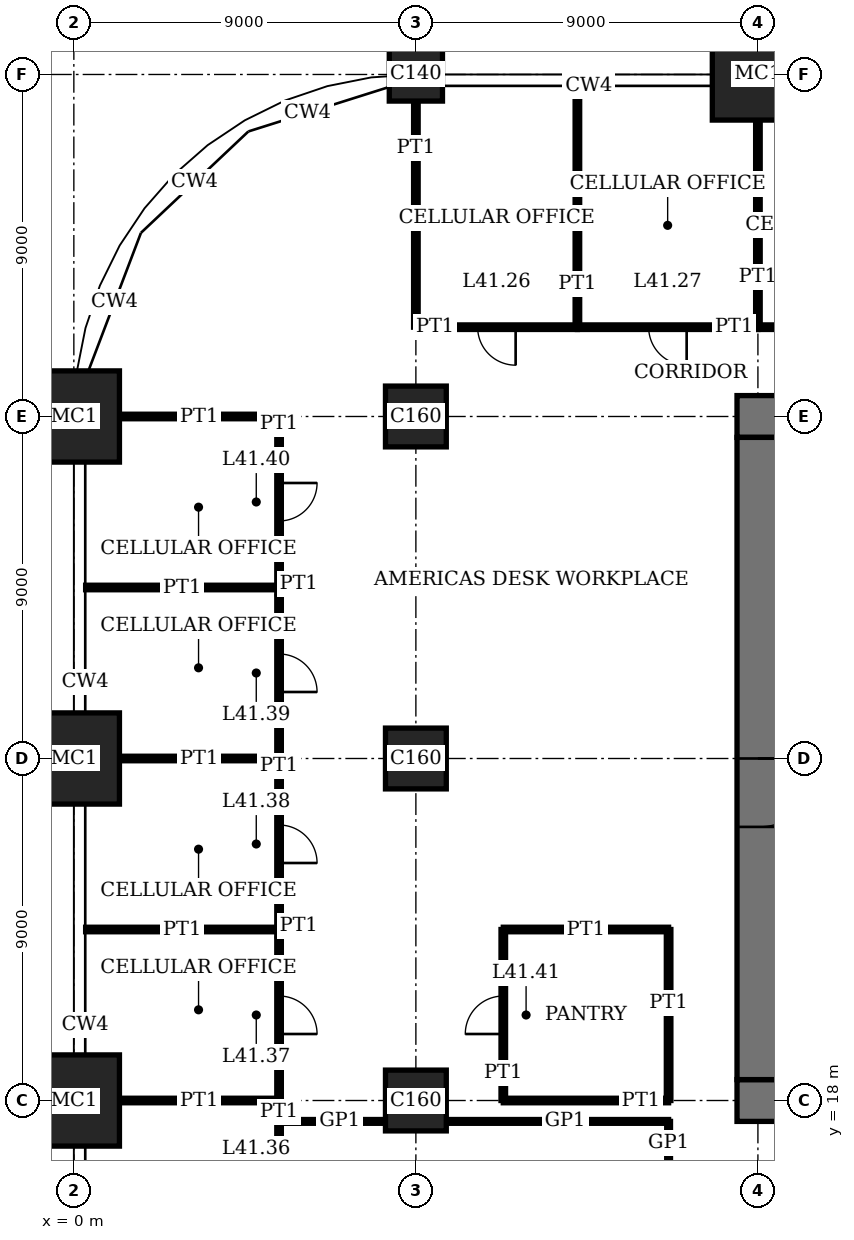
"""IFC4 building model, lengths in metres.
Left out: names, types, materials, properties, quantities, classifications, styles, units other than length and angle.
Written with IfcOpenShell. Run it as: python <this file> out.ifc"""

import sys

from ifc_helpers import new_model, si_unit, direction, frame, frame_2d, origin, origin_2d, place, context, subcontext, project, spatial, rectangle, extrude, element, fill, save


model = new_model("IFC4")
c1 = context("Model", 3, precision=1e-05, world=origin(), true_north=direction((0.0, 1.0)))
c2 = subcontext(c1, "Body", "Model", "MODEL_VIEW")
j1 = project(units=[si_unit("LENGTHUNIT", "METRE"), si_unit("PLANEANGLEUNIT", "RADIAN")], contexts=[c1])
p1 = place(None, origin())
s1 = spatial("IfcSite", under=j1, at=p1, CompositionType="ELEMENT")
p2 = place(p1, origin())
s2 = spatial("IfcBuilding", under=s1, at=p2, CompositionType="ELEMENT")
p3 = place(p2, frame((0.0, 0.0, 170.2)))
s3 = spatial("IfcBuildingStorey", under=s2, at=p3, CompositionType="ELEMENT", Elevation=170.2)
for number, where, z_axis, x_axis in (
    (1, (0.0, 18.0, 0.0), (0.0, 0.0, 1.0), (1.0, 0.0, 0.0)),
    (2, (0.0, 27.0, 0.0), (0.0, 0.0, 1.0), (1.0, 0.0, 0.0)),
    (3, (0.0, 36.0, 0.0), (0.0, 0.0, 1.0), (1.0, 0.0, 0.0)),
):
    element("IfcColumn", number, at=place(p3, frame(where, z_axis=z_axis, x_axis=x_axis)), inside=s3, PredefinedType="COLUMN", context=c2, shape_type="SweptSolid", body=[
        extrude(rectangle(XDim=2.4, YDim=2.4, at=origin_2d()), origin(), (0.0, 0.0, 1.0), 4.0),
    ])
for number, where, z_axis, x_axis in (
    (4, (9.0, 18.0, 0.0), (0.0, 0.0, 1.0), (1.0, 0.0, 0.0)),
    (5, (9.0, 27.0, 0.0), (0.0, 0.0, 1.0), (1.0, 0.0, 0.0)),
    (6, (9.0, 36.0, 0.0), (0.0, 0.0, 1.0), (1.0, 0.0, 0.0)),
):
    element("IfcColumn", number, at=place(p3, frame(where, z_axis=z_axis, x_axis=x_axis)), inside=s3, PredefinedType="COLUMN", context=c2, shape_type="SweptSolid", body=[
        extrude(rectangle(XDim=1.6, YDim=1.6, at=origin_2d()), origin(), (0.0, 0.0, 1.0), 4.0),
    ])
p4 = place(p3, frame((9.0, 45.0, 0.0), z_axis=(0.0, 0.0, 1.0), x_axis=(1.0, 0.0, 0.0)))
e7 = element("IfcColumn", 7, at=p4, inside=s3, PredefinedType="COLUMN", context=c2, shape_type="SweptSolid", body=[
    extrude(rectangle(XDim=1.4, YDim=1.4, at=origin_2d()), origin(), (0.0, 0.0, 1.0), 4.0),
])
p5 = place(p3, frame((18.0, 45.0, 0.0), z_axis=(0.0, 0.0, 1.0), x_axis=(1.0, 0.0, 0.0)))
e8 = element("IfcColumn", 8, at=p5, inside=s3, PredefinedType="COLUMN", context=c2, shape_type="SweptSolid", body=[
    extrude(rectangle(XDim=2.4, YDim=2.4, at=origin_2d()), origin(), (0.0, 0.0, 1.0), 4.0),
])
p6 = place(p3, frame((17.45, 18.0, 0.0), z_axis=(0.0, 0.0, 1.0), x_axis=(1.0, 0.0, 0.0)))
e9 = element("IfcWall", 9, at=p6, inside=s3, PredefinedType="SHEAR", context=c2, shape_type="SweptSolid", body=[
    extrude(rectangle(XDim=28.1, YDim=1.1, at=frame_2d((14.05, 0.0))), origin(), (0.0, 0.0, 1.0), 4.0),
])
p7 = place(p6, frame((11.55, 0.0, 0.0)))
e10 = element("IfcOpeningElement", 10, at=p7, cuts=e9, PredefinedType="OPENING", context=c2, shape_type="SweptSolid", body=[
    extrude(rectangle(XDim=1.0, YDim=2.4, at=frame_2d((0.5, 1.2))), frame((0.0, 0.56, 0.0), z_axis=(0.0, -1.0, 0.0), x_axis=(1.0, 0.0, 0.0)), (0.0, 0.0, 1.0), 1.12),
])
p8 = place(p6, frame((16.55, 0.0, 0.0)))
e11 = element("IfcOpeningElement", 11, at=p8, cuts=e9, PredefinedType="OPENING", context=c2, shape_type="SweptSolid", body=[
    extrude(rectangle(XDim=1.0, YDim=2.4, at=frame_2d((0.5, 1.2))), frame((0.0, 0.56, 0.0), z_axis=(0.0, -1.0, 0.0), x_axis=(1.0, 0.0, 0.0)), (0.0, 0.0, 1.0), 1.12),
])
p9 = place(p6, frame((20.0, 0.0, 0.0)))
e12 = element("IfcOpeningElement", 12, at=p9, cuts=e9, PredefinedType="OPENING", context=c2, shape_type="SweptSolid", body=[
    extrude(rectangle(XDim=1.1, YDim=2.4, at=frame_2d((0.55, 1.2))), frame((0.0, 0.56, 0.0), z_axis=(0.0, -1.0, 0.0), x_axis=(1.0, 0.0, 0.0)), (0.0, 0.0, 1.0), 1.12),
])
p10 = place(p6, frame((24.05, 0.0, 0.0)))
e13 = element("IfcOpeningElement", 13, at=p10, cuts=e9, PredefinedType="OPENING", context=c2, shape_type="SweptSolid", body=[
    extrude(rectangle(XDim=1.0, YDim=2.4, at=frame_2d((0.5, 1.2))), frame((0.0, 0.56, 0.0), z_axis=(0.0, -1.0, 0.0), x_axis=(1.0, 0.0, 0.0)), (0.0, 0.0, 1.0), 1.12),
])
p11 = place(p3, frame((45.55, 36.0, 0.0), z_axis=(0.0, 0.0, 1.0), x_axis=(-1.0, 0.0, 0.0)))
e14 = element("IfcWall", 14, at=p11, inside=s3, PredefinedType="SHEAR", context=c2, shape_type="SweptSolid", body=[
    extrude(rectangle(XDim=28.1, YDim=1.1, at=frame_2d((14.05, 0.0))), origin(), (0.0, 0.0, 1.0), 4.0),
])
p12 = place(p11, frame((11.55, 0.0, 0.0)))
e15 = element("IfcOpeningElement", 15, at=p12, cuts=e14, PredefinedType="OPENING", context=c2, shape_type="SweptSolid", body=[
    extrude(rectangle(XDim=1.0, YDim=2.4, at=frame_2d((0.5, 1.2))), frame((0.0, 0.56, 0.0), z_axis=(0.0, -1.0, 0.0), x_axis=(1.0, 0.0, 0.0)), (0.0, 0.0, 1.0), 1.12),
])
p13 = place(p11, frame((16.55, 0.0, 0.0)))
e16 = element("IfcOpeningElement", 16, at=p13, cuts=e14, PredefinedType="OPENING", context=c2, shape_type="SweptSolid", body=[
    extrude(rectangle(XDim=1.0, YDim=2.4, at=frame_2d((0.5, 1.2))), frame((0.0, 0.56, 0.0), z_axis=(0.0, -1.0, 0.0), x_axis=(1.0, 0.0, 0.0)), (0.0, 0.0, 1.0), 1.12),
])
p14 = place(p11, frame((20.0, 0.0, 0.0)))
e17 = element("IfcOpeningElement", 17, at=p14, cuts=e14, PredefinedType="OPENING", context=c2, shape_type="SweptSolid", body=[
    extrude(rectangle(XDim=1.1, YDim=2.4, at=frame_2d((0.55, 1.2))), frame((0.0, 0.56, 0.0), z_axis=(0.0, -1.0, 0.0), x_axis=(1.0, 0.0, 0.0)), (0.0, 0.0, 1.0), 1.12),
])
p15 = place(p11, frame((24.05, 0.0, 0.0)))
e18 = element("IfcOpeningElement", 18, at=p15, cuts=e14, PredefinedType="OPENING", context=c2, shape_type="SweptSolid", body=[
    extrude(rectangle(XDim=1.0, YDim=2.4, at=frame_2d((0.5, 1.2))), frame((0.0, 0.56, 0.0), z_axis=(0.0, -1.0, 0.0), x_axis=(1.0, 0.0, 0.0)), (0.0, 0.0, 1.0), 1.12),
])
p16 = place(p3, frame((18.0, 35.45, 0.0), z_axis=(0.0, 0.0, 1.0), x_axis=(0.0, -1.0, 0.0)))
e19 = element("IfcWall", 19, at=p16, inside=s3, PredefinedType="SHEAR", context=c2, shape_type="SweptSolid", body=[
    extrude(rectangle(XDim=16.9, YDim=1.1, at=frame_2d((8.45, 0.0))), origin(), (0.0, 0.0, 1.0), 4.0),
])
p17 = place(p16, frame((8.45, 0.0, 0.0)))
e20 = element("IfcOpeningElement", 20, at=p17, cuts=e19, PredefinedType="OPENING", context=c2, shape_type="SweptSolid", body=[
    extrude(rectangle(XDim=1.8, YDim=2.4, at=frame_2d((0.9, 1.2))), frame((0.0, 0.56, 0.0), z_axis=(0.0, -1.0, 0.0), x_axis=(1.0, 0.0, 0.0)), (0.0, 0.0, 1.0), 1.12),
])
p18 = place(p3, frame((5.39, 17.45, 0.0), z_axis=(0.0, 0.0, 1.0), x_axis=(1.0, 0.0, 0.0)))
e21 = element("IfcWall", 21, at=p18, inside=s3, PredefinedType="PARTITIONING", context=c2, shape_type="SweptSolid", body=[
    extrude(rectangle(XDim=2.81, YDim=0.1, at=frame_2d((1.405, 0.0))), origin(), (0.0, 0.0, 1.0), 3.75),
])
p19 = place(p3, frame((9.8, 17.45, 0.0), z_axis=(0.0, 0.0, 1.0), x_axis=(1.0, 0.0, 0.0)))
e22 = element("IfcWall", 22, at=p19, inside=s3, PredefinedType="PARTITIONING", context=c2, shape_type="SweptSolid", body=[
    extrude(rectangle(XDim=5.85, YDim=0.1, at=frame_2d((2.925, 0.0))), origin(), (0.0, 0.0, 1.0), 3.75),
])
p20 = place(p3, frame((1.2, 18.0, 0.0), z_axis=(0.0, 0.0, 1.0), x_axis=(1.0, 0.0, 0.0)))
e23 = element("IfcWall", 23, at=p20, inside=s3, PredefinedType="PARTITIONING", context=c2, shape_type="SweptSolid", body=[
    extrude(rectangle(XDim=4.2, YDim=0.12, at=frame_2d((2.1, 0.0))), origin(), (0.0, 0.0, 1.0), 3.05),
])
p21 = place(p3, frame((11.3, 18.0, 0.0), z_axis=(0.0, 0.0, 1.0), x_axis=(1.0, 0.0, 0.0)))
e24 = element("IfcWall", 24, at=p21, inside=s3, PredefinedType="PARTITIONING", context=c2, shape_type="SweptSolid", body=[
    extrude(rectangle(XDim=4.35, YDim=0.12, at=frame_2d((2.175, 0.0))), origin(), (0.0, 0.0, 1.0), 3.05),
])
p22 = place(p3, frame((0.31, 22.5, 0.0), z_axis=(0.0, 0.0, 1.0), x_axis=(1.0, 0.0, 0.0)))
e25 = element("IfcWall", 25, at=p22, inside=s3, PredefinedType="PARTITIONING", context=c2, shape_type="SweptSolid", body=[
    extrude(rectangle(XDim=5.09, YDim=0.12, at=frame_2d((2.545, 0.0))), origin(), (0.0, 0.0, 1.0), 3.1),
])
p23 = place(p3, frame((11.3, 22.5, 0.0), z_axis=(0.0, 0.0, 1.0), x_axis=(1.0, 0.0, 0.0)))
e26 = element("IfcWall", 26, at=p23, inside=s3, PredefinedType="PARTITIONING", context=c2, shape_type="SweptSolid", body=[
    extrude(rectangle(XDim=4.35, YDim=0.12, at=frame_2d((2.175, 0.0))), origin(), (0.0, 0.0, 1.0), 3.1),
])
p24 = place(p3, frame((1.2, 27.0, 0.0), z_axis=(0.0, 0.0, 1.0), x_axis=(1.0, 0.0, 0.0)))
e27 = element("IfcWall", 27, at=p24, inside=s3, PredefinedType="PARTITIONING", context=c2, shape_type="SweptSolid", body=[
    extrude(rectangle(XDim=4.2, YDim=0.12, at=frame_2d((2.1, 0.0))), origin(), (0.0, 0.0, 1.0), 3.05),
])
p25 = place(p3, frame((0.31, 31.5, 0.0), z_axis=(0.0, 0.0, 1.0), x_axis=(1.0, 0.0, 0.0)))
e28 = element("IfcWall", 28, at=p25, inside=s3, PredefinedType="PARTITIONING", context=c2, shape_type="SweptSolid", body=[
    extrude(rectangle(XDim=5.09, YDim=0.12, at=frame_2d((2.545, 0.0))), origin(), (0.0, 0.0, 1.0), 3.1),
])
p26 = place(p3, frame((1.2, 36.0, 0.0), z_axis=(0.0, 0.0, 1.0), x_axis=(1.0, 0.0, 0.0)))
e29 = element("IfcWall", 29, at=p26, inside=s3, PredefinedType="PARTITIONING", context=c2, shape_type="SweptSolid", body=[
    extrude(rectangle(XDim=4.2, YDim=0.12, at=frame_2d((2.1, 0.0))), origin(), (0.0, 0.0, 1.0), 3.05),
])
p27 = place(p3, frame((9.0, 38.35, 0.0), z_axis=(0.0, 0.0, 1.0), x_axis=(1.0, 0.0, 0.0)))
e30 = element("IfcWall", 30, at=p27, inside=s3, PredefinedType="PARTITIONING", context=c2, shape_type="SweptSolid", body=[
    extrude(rectangle(XDim=4.25, YDim=0.12, at=frame_2d((2.125, 0.0))), origin(), (0.0, 0.0, 1.0), 3.75),
])
p28 = place(p27, frame((1.625, 0.0, 0.0)))
e31 = element("IfcOpeningElement", 31, at=p28, cuts=e30, PredefinedType="OPENING", context=c2, shape_type="SweptSolid", body=[
    extrude(rectangle(XDim=1.0, YDim=2.4, at=frame_2d((0.5, 1.2))), frame((0.0, 0.07, 0.0), z_axis=(0.0, -1.0, 0.0), x_axis=(1.0, 0.0, 0.0)), (0.0, 0.0, 1.0), 0.14),
])
p29 = place(p3, frame((13.25, 38.35, 0.0), z_axis=(0.0, 0.0, 1.0), x_axis=(1.0, 0.0, 0.0)))
e32 = element("IfcWall", 32, at=p29, inside=s3, PredefinedType="PARTITIONING", context=c2, shape_type="SweptSolid", body=[
    extrude(rectangle(XDim=4.75, YDim=0.12, at=frame_2d((2.375, 0.0))), origin(), (0.0, 0.0, 1.0), 3.75),
])
p30 = place(p29, frame((1.875, 0.0, 0.0)))
e33 = element("IfcOpeningElement", 33, at=p30, cuts=e32, PredefinedType="OPENING", context=c2, shape_type="SweptSolid", body=[
    extrude(rectangle(XDim=1.0, YDim=2.4, at=frame_2d((0.5, 1.2))), frame((0.0, 0.07, 0.0), z_axis=(0.0, -1.0, 0.0), x_axis=(1.0, 0.0, 0.0)), (0.0, 0.0, 1.0), 0.14),
])
p31 = place(p3, frame((18.0, 38.35, 0.0), z_axis=(0.0, 0.0, 1.0), x_axis=(1.0, 0.0, 0.0)))
e34 = element("IfcWall", 34, at=p31, inside=s3, PredefinedType="PARTITIONING", context=c2, shape_type="SweptSolid", body=[
    extrude(rectangle(XDim=4.5, YDim=0.12, at=frame_2d((2.25, 0.0))), origin(), (0.0, 0.0, 1.0), 3.75),
])
p32 = place(p31, frame((1.75, 0.0, 0.0)))
e35 = element("IfcOpeningElement", 35, at=p32, cuts=e34, PredefinedType="OPENING", context=c2, shape_type="SweptSolid", body=[
    extrude(rectangle(XDim=1.0, YDim=2.4, at=frame_2d((0.5, 1.2))), frame((0.0, 0.07, 0.0), z_axis=(0.0, -1.0, 0.0), x_axis=(1.0, 0.0, 0.0)), (0.0, 0.0, 1.0), 0.14),
])
p33 = place(p3, frame((5.4, 13.25, 0.0), z_axis=(0.0, 0.0, 1.0), x_axis=(0.0, 1.0, 0.0)))
e36 = element("IfcWall", 36, at=p33, inside=s3, PredefinedType="PARTITIONING", context=c2, shape_type="SweptSolid", body=[
    extrude(rectangle(XDim=4.75, YDim=0.12, at=frame_2d((2.375, 0.0))), origin(), (0.0, 0.0, 1.0), 3.75),
])
p34 = place(p33, frame((1.875, 0.0, 0.0)))
e37 = element("IfcOpeningElement", 37, at=p34, cuts=e36, PredefinedType="OPENING", context=c2, shape_type="SweptSolid", body=[
    extrude(rectangle(XDim=1.0, YDim=2.4, at=frame_2d((0.5, 1.2))), frame((0.0, 0.07, 0.0), z_axis=(0.0, -1.0, 0.0), x_axis=(1.0, 0.0, 0.0)), (0.0, 0.0, 1.0), 0.14),
])
p35 = place(p3, frame((5.4, 18.0, 0.0), z_axis=(0.0, 0.0, 1.0), x_axis=(0.0, 1.0, 0.0)))
e38 = element("IfcWall", 38, at=p35, inside=s3, PredefinedType="PARTITIONING", context=c2, shape_type="SweptSolid", body=[
    extrude(rectangle(XDim=4.5, YDim=0.12, at=frame_2d((2.25, 0.0))), origin(), (0.0, 0.0, 1.0), 3.75),
])
p36 = place(p35, frame((1.75, 0.0, 0.0)))
e39 = element("IfcOpeningElement", 39, at=p36, cuts=e38, PredefinedType="OPENING", context=c2, shape_type="SweptSolid", body=[
    extrude(rectangle(XDim=1.0, YDim=2.4, at=frame_2d((0.5, 1.2))), frame((0.0, 0.07, 0.0), z_axis=(0.0, -1.0, 0.0), x_axis=(1.0, 0.0, 0.0)), (0.0, 0.0, 1.0), 0.14),
])
p37 = place(p3, frame((5.4, 22.5, 0.0), z_axis=(0.0, 0.0, 1.0), x_axis=(0.0, 1.0, 0.0)))
e40 = element("IfcWall", 40, at=p37, inside=s3, PredefinedType="PARTITIONING", context=c2, shape_type="SweptSolid", body=[
    extrude(rectangle(XDim=4.5, YDim=0.12, at=frame_2d((2.25, 0.0))), origin(), (0.0, 0.0, 1.0), 3.75),
])
p38 = place(p37, frame((1.75, 0.0, 0.0)))
e41 = element("IfcOpeningElement", 41, at=p38, cuts=e40, PredefinedType="OPENING", context=c2, shape_type="SweptSolid", body=[
    extrude(rectangle(XDim=1.0, YDim=2.4, at=frame_2d((0.5, 1.2))), frame((0.0, 0.07, 0.0), z_axis=(0.0, -1.0, 0.0), x_axis=(1.0, 0.0, 0.0)), (0.0, 0.0, 1.0), 0.14),
])
p39 = place(p3, frame((5.4, 27.0, 0.0), z_axis=(0.0, 0.0, 1.0), x_axis=(0.0, 1.0, 0.0)))
e42 = element("IfcWall", 42, at=p39, inside=s3, PredefinedType="PARTITIONING", context=c2, shape_type="SweptSolid", body=[
    extrude(rectangle(XDim=4.5, YDim=0.12, at=frame_2d((2.25, 0.0))), origin(), (0.0, 0.0, 1.0), 3.75),
])
p40 = place(p39, frame((1.75, 0.0, 0.0)))
e43 = element("IfcOpeningElement", 43, at=p40, cuts=e42, PredefinedType="OPENING", context=c2, shape_type="SweptSolid", body=[
    extrude(rectangle(XDim=1.0, YDim=2.4, at=frame_2d((0.5, 1.2))), frame((0.0, 0.07, 0.0), z_axis=(0.0, -1.0, 0.0), x_axis=(1.0, 0.0, 0.0)), (0.0, 0.0, 1.0), 0.14),
])
p41 = place(p3, frame((5.4, 31.5, 0.0), z_axis=(0.0, 0.0, 1.0), x_axis=(0.0, 1.0, 0.0)))
e44 = element("IfcWall", 44, at=p41, inside=s3, PredefinedType="PARTITIONING", context=c2, shape_type="SweptSolid", body=[
    extrude(rectangle(XDim=4.5, YDim=0.12, at=frame_2d((2.25, 0.0))), origin(), (0.0, 0.0, 1.0), 3.75),
])
p42 = place(p41, frame((1.75, 0.0, 0.0)))
e45 = element("IfcOpeningElement", 45, at=p42, cuts=e44, PredefinedType="OPENING", context=c2, shape_type="SweptSolid", body=[
    extrude(rectangle(XDim=1.0, YDim=2.4, at=frame_2d((0.5, 1.2))), frame((0.0, 0.07, 0.0), z_axis=(0.0, -1.0, 0.0), x_axis=(1.0, 0.0, 0.0)), (0.0, 0.0, 1.0), 0.14),
])
p43 = place(p3, frame((9.0, 38.35, 0.0), z_axis=(0.0, 0.0, 1.0), x_axis=(0.0, 1.0, 0.0)))
e46 = element("IfcWall", 46, at=p43, inside=s3, PredefinedType="PARTITIONING", context=c2, shape_type="SweptSolid", body=[
    extrude(rectangle(XDim=5.95, YDim=0.12, at=frame_2d((2.975, 0.0))), origin(), (0.0, 0.0, 1.0), 3.05),
])
p44 = place(p3, frame((11.3, 18.0, 0.0), z_axis=(0.0, 0.0, 1.0), x_axis=(0.0, 1.0, 0.0)))
e47 = element("IfcWall", 47, at=p44, inside=s3, PredefinedType="PARTITIONING", context=c2, shape_type="SweptSolid", body=[
    extrude(rectangle(XDim=4.5, YDim=0.12, at=frame_2d((2.25, 0.0))), origin(), (0.0, 0.0, 1.0), 3.75),
])
p45 = place(p44, frame((1.75, 0.0, 0.0)))
e48 = element("IfcOpeningElement", 48, at=p45, cuts=e47, PredefinedType="OPENING", context=c2, shape_type="SweptSolid", body=[
    extrude(rectangle(XDim=1.0, YDim=2.4, at=frame_2d((0.5, 1.2))), frame((0.0, 0.07, 0.0), z_axis=(0.0, -1.0, 0.0), x_axis=(1.0, 0.0, 0.0)), (0.0, 0.0, 1.0), 0.14),
])
p46 = place(p3, frame((13.25, 38.35, 0.0), z_axis=(0.0, 0.0, 1.0), x_axis=(0.0, 1.0, 0.0)))
e49 = element("IfcWall", 49, at=p46, inside=s3, PredefinedType="PARTITIONING", context=c2, shape_type="SweptSolid", body=[
    extrude(rectangle(XDim=6.34, YDim=0.12, at=frame_2d((3.17, 0.0))), origin(), (0.0, 0.0, 1.0), 3.75),
])
p47 = place(p3, frame((15.65, 18.0, 0.0), z_axis=(0.0, 0.0, 1.0), x_axis=(0.0, 1.0, 0.0)))
e50 = element("IfcWall", 50, at=p47, inside=s3, PredefinedType="PARTITIONING", context=c2, shape_type="SweptSolid", body=[
    extrude(rectangle(XDim=4.5, YDim=0.12, at=frame_2d((2.25, 0.0))), origin(), (0.0, 0.0, 1.0), 3.75),
])
p48 = place(p3, frame((15.65, 15.65, 0.0), z_axis=(0.0, 0.0, 1.0), x_axis=(0.0, 1.0, 0.0)))
e51 = element("IfcWall", 51, at=p48, inside=s3, PredefinedType="PARTITIONING", context=c2, shape_type="SweptSolid", body=[
    extrude(rectangle(XDim=1.8, YDim=0.1, at=frame_2d((0.9, 0.0))), origin(), (0.0, 0.0, 1.0), 3.75),
])
p49 = place(p3, frame((18.0, 38.35, 0.0), z_axis=(0.0, 0.0, 1.0), x_axis=(0.0, 1.0, 0.0)))
e52 = element("IfcWall", 52, at=p49, inside=s3, PredefinedType="PARTITIONING", context=c2, shape_type="SweptSolid", body=[
    extrude(rectangle(XDim=5.45, YDim=0.12, at=frame_2d((2.725, 0.0))), origin(), (0.0, 0.0, 1.0), 3.05),
])
p50 = place(p17, origin())
e53 = element("IfcDoor", 53, at=p50, inside=s3, OperationType="DOUBLE_DOOR_DOUBLE_SWING", PredefinedType="DOOR", context=c2, shape_type="SweptSolid", body=[
    extrude(rectangle(XDim=1.8, YDim=2.4, at=frame_2d((0.9, 1.2))), frame((0.0, 0.03, 0.0), z_axis=(0.0, -1.0, 0.0), x_axis=(1.0, 0.0, 0.0)), (0.0, 0.0, 1.0), 0.06),
    extrude(rectangle(XDim=0.04, YDim=2.4, at=frame_2d((0.02, 1.2))), frame((0.0, 0.55, 0.0), z_axis=(0.0, -1.0, 0.0), x_axis=(1.0, 0.0, 0.0)), (0.0, 0.0, 1.0), 1.1),
    extrude(rectangle(XDim=0.04, YDim=2.4, at=frame_2d((1.78, 1.2))), frame((0.0, 0.55, 0.0), z_axis=(0.0, -1.0, 0.0), x_axis=(1.0, 0.0, 0.0)), (0.0, 0.0, 1.0), 1.1),
    extrude(rectangle(XDim=1.8, YDim=0.04, at=frame_2d((0.9, 2.38))), frame((0.0, 0.55, 0.0), z_axis=(0.0, -1.0, 0.0), x_axis=(1.0, 0.0, 0.0)), (0.0, 0.0, 1.0), 1.1),
])
fill(e20, e53)
p51 = place(p28, origin())
e54 = element("IfcDoor", 54, at=p51, inside=s3, OperationType="SINGLE_SWING_RIGHT", PredefinedType="DOOR", context=c2, shape_type="SweptSolid", body=[
    extrude(rectangle(XDim=1.0, YDim=2.4, at=frame_2d((0.5, 1.2))), frame((0.0, 0.025, 0.0), z_axis=(0.0, -1.0, 0.0), x_axis=(1.0, 0.0, 0.0)), (0.0, 0.0, 1.0), 0.05),
])
fill(e31, e54)
p52 = place(p30, origin())
e55 = element("IfcDoor", 55, at=p52, inside=s3, OperationType="SINGLE_SWING_RIGHT", PredefinedType="DOOR", context=c2, shape_type="SweptSolid", body=[
    extrude(rectangle(XDim=1.0, YDim=2.4, at=frame_2d((0.5, 1.2))), frame((0.0, 0.025, 0.0), z_axis=(0.0, -1.0, 0.0), x_axis=(1.0, 0.0, 0.0)), (0.0, 0.0, 1.0), 0.05),
])
fill(e33, e55)
p53 = place(p36, origin())
e56 = element("IfcDoor", 56, at=p53, inside=s3, OperationType="SINGLE_SWING_LEFT", PredefinedType="DOOR", context=c2, shape_type="SweptSolid", body=[
    extrude(rectangle(XDim=1.0, YDim=2.4, at=frame_2d((0.5, 1.2))), frame((0.0, 0.025, 0.0), z_axis=(0.0, -1.0, 0.0), x_axis=(1.0, 0.0, 0.0)), (0.0, 0.0, 1.0), 0.05),
])
fill(e39, e56)
p54 = place(p38, origin())
e57 = element("IfcDoor", 57, at=p54, inside=s3, OperationType="SINGLE_SWING_LEFT", PredefinedType="DOOR", context=c2, shape_type="SweptSolid", body=[
    extrude(rectangle(XDim=1.0, YDim=2.4, at=frame_2d((0.5, 1.2))), frame((0.0, 0.025, 0.0), z_axis=(0.0, -1.0, 0.0), x_axis=(1.0, 0.0, 0.0)), (0.0, 0.0, 1.0), 0.05),
])
fill(e41, e57)
p55 = place(p40, origin())
e58 = element("IfcDoor", 58, at=p55, inside=s3, OperationType="SINGLE_SWING_LEFT", PredefinedType="DOOR", context=c2, shape_type="SweptSolid", body=[
    extrude(rectangle(XDim=1.0, YDim=2.4, at=frame_2d((0.5, 1.2))), frame((0.0, 0.025, 0.0), z_axis=(0.0, -1.0, 0.0), x_axis=(1.0, 0.0, 0.0)), (0.0, 0.0, 1.0), 0.05),
])
fill(e43, e58)
p56 = place(p42, origin())
e59 = element("IfcDoor", 59, at=p56, inside=s3, OperationType="SINGLE_SWING_RIGHT", PredefinedType="DOOR", context=c2, shape_type="SweptSolid", body=[
    extrude(rectangle(XDim=1.0, YDim=2.4, at=frame_2d((0.5, 1.2))), frame((0.0, 0.025, 0.0), z_axis=(0.0, -1.0, 0.0), x_axis=(1.0, 0.0, 0.0)), (0.0, 0.0, 1.0), 0.05),
])
fill(e45, e59)
p57 = place(p45, origin())
e60 = element("IfcDoor", 60, at=p57, inside=s3, OperationType="SINGLE_SWING_RIGHT", PredefinedType="DOOR", context=c2, shape_type="SweptSolid", body=[
    extrude(rectangle(XDim=1.0, YDim=2.4, at=frame_2d((0.5, 1.2))), frame((0.0, 0.025, 0.0), z_axis=(0.0, -1.0, 0.0), x_axis=(1.0, 0.0, 0.0)), (0.0, 0.0, 1.0), 0.05),
])
fill(e48, e60)
save(model, sys.argv[1])
